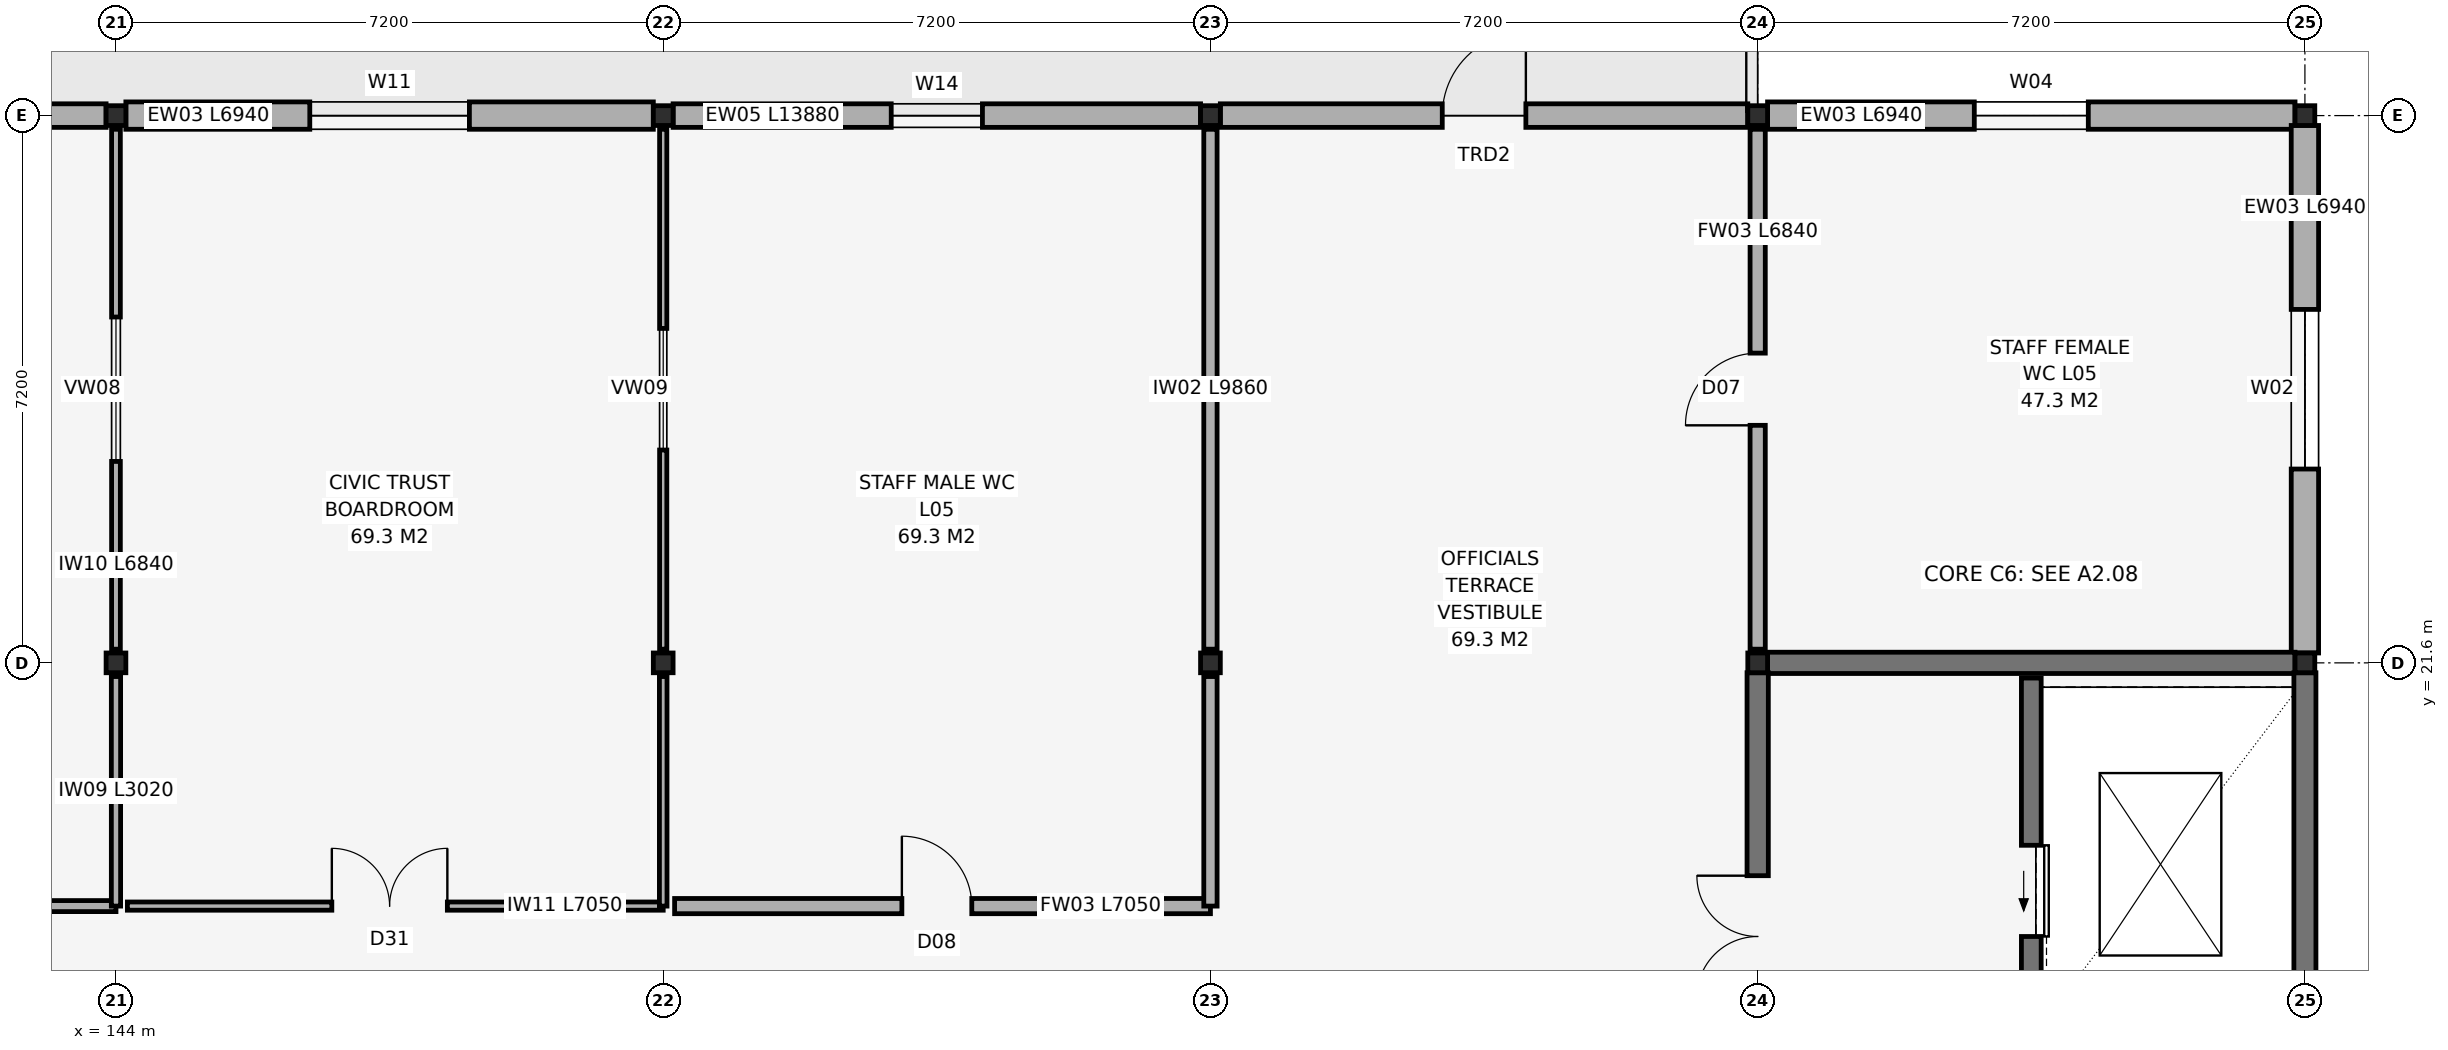
"""IFC4 building model, lengths in metres.
Left out: names, types, materials, properties, quantities, classifications, styles, units other than length and angle.
Written with IfcOpenShell. Run it as: python <this file> out.ifc"""

import sys

from ifc_helpers import new_model, si_unit, direction, frame, frame_2d, origin, origin_2d, place, context, subcontext, project, spatial, rectangle, hollow_rectangle, extrude, element, fill, save


model = new_model("IFC4")
c1 = context("Model", 3, precision=1e-05, world=origin(), true_north=direction((0.0, 1.0)))
c2 = subcontext(c1, "Body", "Model", "MODEL_VIEW")
j1 = project(units=[si_unit("LENGTHUNIT", "METRE"), si_unit("PLANEANGLEUNIT", "RADIAN")], contexts=[c1])
p1 = place(None, origin())
s1 = spatial("IfcSite", under=j1, at=p1, CompositionType="ELEMENT")
p2 = place(p1, origin())
s2 = spatial("IfcBuilding", under=s1, at=p2, CompositionType="ELEMENT")
p3 = place(p2, frame((0.0, 0.0, 23.4)))
s3 = spatial("IfcBuildingStorey", under=s2, at=p3, CompositionType="ELEMENT", Elevation=23.4)
for number, where, z_axis, x_axis in (
    (1, (144.0, 21.6, 0.0), (0.0, 0.0, 1.0), (1.0, 0.0, 0.0)),
    (2, (144.0, 28.8, 0.0), (0.0, 0.0, 1.0), (1.0, 0.0, 0.0)),
    (3, (151.2, 21.6, 0.0), (0.0, 0.0, 1.0), (1.0, 0.0, 0.0)),
    (4, (151.2, 28.8, 0.0), (0.0, 0.0, 1.0), (1.0, 0.0, 0.0)),
    (5, (158.4, 21.6, 0.0), (0.0, 0.0, 1.0), (1.0, 0.0, 0.0)),
    (6, (158.4, 28.8, 0.0), (0.0, 0.0, 1.0), (1.0, 0.0, 0.0)),
    (7, (165.6, 21.6, 0.0), (0.0, 0.0, 1.0), (1.0, 0.0, 0.0)),
    (8, (165.6, 28.8, 0.0), (0.0, 0.0, 1.0), (1.0, 0.0, 0.0)),
    (9, (172.8, 21.6, 0.0), (0.0, 0.0, 1.0), (1.0, 0.0, 0.0)),
    (10, (172.8, 28.8, 0.0), (0.0, 0.0, 1.0), (1.0, 0.0, 0.0)),
):
    element("IfcColumn", number, at=place(p3, frame(where, z_axis=z_axis, x_axis=x_axis)), inside=s3, PredefinedType="COLUMN", context=c2, shape_type="SweptSolid", body=[
        extrude(hollow_rectangle(XDim=0.26, YDim=0.26, WallThickness=0.012, at=origin_2d()), origin(), (0.0, 0.0, 1.0), 4.2),
    ])
p4 = place(p3, frame((136.93, 28.8, 0.0), z_axis=(0.0, 0.0, 1.0), x_axis=(1.0, 0.0, 0.0)))
e11 = element("IfcWall", 11, at=p4, inside=s3, PredefinedType="SOLIDWALL", context=c2, shape_type="SweptSolid", body=[
    extrude(rectangle(XDim=6.94, YDim=0.31, at=frame_2d((3.47, 0.0))), origin(), (0.0, 0.0, 1.0), 3.98),
])
p5 = place(p4, frame((2.92, 0.0, 0.0)))
e12 = element("IfcOpeningElement", 12, at=p5, cuts=e11, PredefinedType="OPENING", context=c2, shape_type="SweptSolid", body=[
    extrude(rectangle(XDim=1.1, YDim=2.2, at=frame_2d((0.55, 1.1))), frame((0.0, 0.17, 0.0), z_axis=(0.0, -1.0, 0.0), x_axis=(1.0, 0.0, 0.0)), (0.0, 0.0, 1.0), 0.34),
])
p6 = place(p3, frame((144.13, 28.8, 0.0), z_axis=(0.0, 0.0, 1.0), x_axis=(1.0, 0.0, 0.0)))
e13 = element("IfcWall", 13, at=p6, inside=s3, PredefinedType="SOLIDWALL", context=c2, shape_type="SweptSolid", body=[
    extrude(rectangle(XDim=6.94, YDim=0.36, at=frame_2d((3.47, 0.0))), origin(), (0.0, 0.0, 1.0), 3.98),
])
p7 = place(p6, frame((2.42, 0.0, 0.95)))
e14 = element("IfcOpeningElement", 14, at=p7, cuts=e13, PredefinedType="OPENING", context=c2, shape_type="SweptSolid", body=[
    extrude(rectangle(XDim=2.1, YDim=1.75, at=frame_2d((1.05, 0.875))), frame((0.0, 0.195, 0.0), z_axis=(0.0, -1.0, 0.0), x_axis=(1.0, 0.0, 0.0)), (0.0, 0.0, 1.0), 0.39),
])
p8 = place(p3, frame((151.33, 28.8, 0.0), z_axis=(0.0, 0.0, 1.0), x_axis=(1.0, 0.0, 0.0)))
e15 = element("IfcWall", 15, at=p8, inside=s3, PredefinedType="SOLIDWALL", context=c2, shape_type="SweptSolid", body=[
    extrude(rectangle(XDim=6.94, YDim=0.31, at=frame_2d((3.47, 0.0))), origin(), (0.0, 0.0, 1.0), 3.98),
])
p9 = place(p8, frame((2.87, 0.0, 0.95)))
e16 = element("IfcOpeningElement", 16, at=p9, cuts=e15, PredefinedType="OPENING", context=c2, shape_type="SweptSolid", body=[
    extrude(rectangle(XDim=1.2, YDim=1.75, at=frame_2d((0.6, 0.875))), frame((0.0, 0.17, 0.0), z_axis=(0.0, -1.0, 0.0), x_axis=(1.0, 0.0, 0.0)), (0.0, 0.0, 1.0), 0.34),
])
p10 = place(p3, frame((158.53, 28.8, 0.0), z_axis=(0.0, 0.0, 1.0), x_axis=(1.0, 0.0, 0.0)))
e17 = element("IfcWall", 17, at=p10, inside=s3, PredefinedType="SOLIDWALL", context=c2, shape_type="SweptSolid", body=[
    extrude(rectangle(XDim=6.94, YDim=0.31, at=frame_2d((3.47, 0.0))), origin(), (0.0, 0.0, 1.0), 3.98),
])
p11 = place(p10, frame((2.92, 0.0, 0.0)))
e18 = element("IfcOpeningElement", 18, at=p11, cuts=e17, PredefinedType="OPENING", context=c2, shape_type="SweptSolid", body=[
    extrude(rectangle(XDim=1.1, YDim=2.2, at=frame_2d((0.55, 1.1))), frame((0.0, 0.17, 0.0), z_axis=(0.0, -1.0, 0.0), x_axis=(1.0, 0.0, 0.0)), (0.0, 0.0, 1.0), 0.34),
])
p12 = place(p3, frame((165.73, 28.8, 0.0), z_axis=(0.0, 0.0, 1.0), x_axis=(1.0, 0.0, 0.0)))
e19 = element("IfcWall", 19, at=p12, inside=s3, PredefinedType="SOLIDWALL", context=c2, shape_type="SweptSolid", body=[
    extrude(rectangle(XDim=6.94, YDim=0.36, at=frame_2d((3.47, 0.0))), origin(), (0.0, 0.0, 1.0), 3.98),
])
p13 = place(p12, frame((2.72, 0.0, 0.95)))
e20 = element("IfcOpeningElement", 20, at=p13, cuts=e19, PredefinedType="OPENING", context=c2, shape_type="SweptSolid", body=[
    extrude(rectangle(XDim=1.5, YDim=2.2, at=frame_2d((0.75, 1.1))), frame((0.0, 0.195, 0.0), z_axis=(0.0, -1.0, 0.0), x_axis=(1.0, 0.0, 0.0)), (0.0, 0.0, 1.0), 0.39),
])
p14 = place(p3, frame((172.8, 21.73, 0.0), z_axis=(0.0, 0.0, 1.0), x_axis=(0.0, 1.0, 0.0)))
e21 = element("IfcWall", 21, at=p14, inside=s3, PredefinedType="SOLIDWALL", context=c2, shape_type="SweptSolid", body=[
    extrude(rectangle(XDim=6.94, YDim=0.36, at=frame_2d((3.47, 0.0))), origin(), (0.0, 0.0, 1.0), 3.98),
])
p15 = place(p14, frame((2.42, 0.0, 0.95)))
e22 = element("IfcOpeningElement", 22, at=p15, cuts=e21, PredefinedType="OPENING", context=c2, shape_type="SweptSolid", body=[
    extrude(rectangle(XDim=2.1, YDim=2.65, at=frame_2d((1.05, 1.325))), frame((0.0, 0.195, 0.0), z_axis=(0.0, -1.0, 0.0), x_axis=(1.0, 0.0, 0.0)), (0.0, 0.0, 1.0), 0.39),
])
p16 = place(p3, frame((165.73, 21.6, 0.0), z_axis=(0.0, 0.0, 1.0), x_axis=(1.0, 0.0, 0.0)))
e23 = element("IfcWall", 23, at=p16, inside=s3, PredefinedType="SHEAR", context=c2, shape_type="SweptSolid", body=[
    extrude(rectangle(XDim=6.94, YDim=0.28, at=frame_2d((3.47, 0.0))), origin(), (0.0, 0.0, 1.0), 4.0),
])
p17 = place(p3, frame((165.6, 14.53, 0.0), z_axis=(0.0, 0.0, 1.0), x_axis=(0.0, 1.0, 0.0)))
e24 = element("IfcWall", 24, at=p17, inside=s3, PredefinedType="SHEAR", context=c2, shape_type="SweptSolid", body=[
    extrude(rectangle(XDim=6.94, YDim=0.28, at=frame_2d((3.47, 0.0))), origin(), (0.0, 0.0, 1.0), 4.0),
])
p18 = place(p17, frame((2.67, 0.0, 0.0)))
e25 = element("IfcOpeningElement", 25, at=p18, cuts=e24, PredefinedType="OPENING", context=c2, shape_type="SweptSolid", body=[
    extrude(rectangle(XDim=1.6, YDim=2.2, at=frame_2d((0.8, 1.1))), frame((0.0, 0.155, 0.0), z_axis=(0.0, -1.0, 0.0), x_axis=(1.0, 0.0, 0.0)), (0.0, 0.0, 1.0), 0.31),
])
p19 = place(p3, frame((172.8, 14.53, 0.0), z_axis=(0.0, 0.0, 1.0), x_axis=(0.0, 1.0, 0.0)))
e26 = element("IfcWall", 26, at=p19, inside=s3, PredefinedType="SHEAR", context=c2, shape_type="SweptSolid", body=[
    extrude(rectangle(XDim=6.94, YDim=0.29, at=frame_2d((3.47, 0.0))), origin(), (0.0, 0.0, 1.0), 4.0),
])
p20 = place(p3, frame((169.2, 7.4, 0.0), z_axis=(0.0, 0.0, 1.0), x_axis=(0.0, 1.0, 0.0)))
e27 = element("IfcWall", 27, at=p20, inside=s3, PredefinedType="SHEAR", context=c2, shape_type="SweptSolid", body=[
    extrude(rectangle(XDim=14.0, YDim=0.26, at=frame_2d((7.0, 0.0))), origin(), (0.0, 0.0, 1.0), 4.0),
])
p21 = place(p20, frame((1.65, 0.0, 0.0)))
e28 = element("IfcOpeningElement", 28, at=p21, cuts=e27, PredefinedType="OPENING", context=c2, shape_type="SweptSolid", body=[
    extrude(rectangle(XDim=1.1, YDim=2.15, at=frame_2d((0.55, 1.075))), frame((0.0, 0.145, 0.0), z_axis=(0.0, -1.0, 0.0), x_axis=(1.0, 0.0, 0.0)), (0.0, 0.0, 1.0), 0.29),
])
p22 = place(p20, frame((10.6, 0.0, 0.0)))
e29 = element("IfcOpeningElement", 29, at=p22, cuts=e27, PredefinedType="OPENING", context=c2, shape_type="SweptSolid", body=[
    extrude(rectangle(XDim=1.2, YDim=2.25, at=frame_2d((0.6, 1.125))), frame((0.0, 0.145, 0.0), z_axis=(0.0, -1.0, 0.0), x_axis=(1.0, 0.0, 0.0)), (0.0, 0.0, 1.0), 0.29),
])
p23 = place(p3, frame((129.6, 18.4, 0.0), z_axis=(0.0, 0.0, 1.0), x_axis=(1.0, 0.0, 0.0)))
e30 = element("IfcWall", 30, at=p23, inside=s3, PredefinedType="PARTITIONING", context=c2, shape_type="SweptSolid", body=[
    extrude(rectangle(XDim=14.4, YDim=0.145, at=frame_2d((7.2, 0.0))), origin(), (0.0, 0.0, 1.0), 3.98),
])
p24 = place(p23, frame((3.13, 0.0, 0.0)))
e31 = element("IfcOpeningElement", 31, at=p24, cuts=e30, PredefinedType="OPENING", context=c2, shape_type="SweptSolid", body=[
    extrude(rectangle(XDim=0.94, YDim=2.15, at=frame_2d((0.47, 1.075))), frame((0.0, 0.087, 0.0), z_axis=(0.0, -1.0, 0.0), x_axis=(1.0, 0.0, 0.0)), (0.0, 0.0, 1.0), 0.175),
])
p25 = place(p3, frame((144.0, 18.4, 0.0), z_axis=(0.0, 0.0, 1.0), x_axis=(0.0, 1.0, 0.0)))
e32 = element("IfcWall", 32, at=p25, inside=s3, PredefinedType="PARTITIONING", context=c2, shape_type="SweptSolid", body=[
    extrude(rectangle(XDim=3.02, YDim=0.122, at=frame_2d((1.51, 0.0))), origin(), (0.0, 0.0, 1.0), 3.98),
])
p26 = place(p3, frame((144.0, 21.78, 0.0), z_axis=(0.0, 0.0, 1.0), x_axis=(0.0, 1.0, 0.0)))
e33 = element("IfcWall", 33, at=p26, inside=s3, PredefinedType="PARTITIONING", context=c2, shape_type="SweptSolid", body=[
    extrude(rectangle(XDim=6.84, YDim=0.115, at=frame_2d((3.42, 0.0))), origin(), (0.0, 0.0, 1.0), 3.98),
])
p27 = place(p26, frame((2.47, 0.0, 0.95)))
e34 = element("IfcOpeningElement", 34, at=p27, cuts=e33, PredefinedType="OPENING", context=c2, shape_type="SweptSolid", body=[
    extrude(rectangle(XDim=1.9, YDim=1.35, at=frame_2d((0.95, 0.675))), frame((0.0, 0.072, 0.0), z_axis=(0.0, -1.0, 0.0), x_axis=(1.0, 0.0, 0.0)), (0.0, 0.0, 1.0), 0.145),
])
p28 = place(p3, frame((144.15, 18.4, 0.0), z_axis=(0.0, 0.0, 1.0), x_axis=(1.0, 0.0, 0.0)))
e35 = element("IfcWall", 35, at=p28, inside=s3, PredefinedType="PARTITIONING", context=c2, shape_type="SweptSolid", body=[
    extrude(rectangle(XDim=7.05, YDim=0.108, at=frame_2d((3.525, 0.0))), origin(), (0.0, 0.0, 1.0), 3.98),
])
p29 = place(p28, frame((2.69, 0.0, 0.0)))
e36 = element("IfcOpeningElement", 36, at=p29, cuts=e35, PredefinedType="OPENING", context=c2, shape_type="SweptSolid", body=[
    extrude(rectangle(XDim=1.52, YDim=2.2, at=frame_2d((0.76, 1.1))), frame((0.0, 0.069, 0.0), z_axis=(0.0, -1.0, 0.0), x_axis=(1.0, 0.0, 0.0)), (0.0, 0.0, 1.0), 0.138),
])
p30 = place(p3, frame((151.2, 18.4, 0.0), z_axis=(0.0, 0.0, 1.0), x_axis=(0.0, 1.0, 0.0)))
e37 = element("IfcWall", 37, at=p30, inside=s3, PredefinedType="PARTITIONING", context=c2, shape_type="SweptSolid", body=[
    extrude(rectangle(XDim=3.02, YDim=0.1, at=frame_2d((1.51, 0.0))), origin(), (0.0, 0.0, 1.0), 3.98),
])
p31 = place(p3, frame((151.2, 21.78, 0.0), z_axis=(0.0, 0.0, 1.0), x_axis=(0.0, 1.0, 0.0)))
e38 = element("IfcWall", 38, at=p31, inside=s3, PredefinedType="PARTITIONING", context=c2, shape_type="SweptSolid", body=[
    extrude(rectangle(XDim=6.84, YDim=0.095, at=frame_2d((3.42, 0.0))), origin(), (0.0, 0.0, 1.0), 3.98),
])
p32 = place(p31, frame((2.62, 0.0, 0.95)))
e39 = element("IfcOpeningElement", 39, at=p32, cuts=e38, PredefinedType="OPENING", context=c2, shape_type="SweptSolid", body=[
    extrude(rectangle(XDim=1.6, YDim=1.35, at=frame_2d((0.8, 0.675))), frame((0.0, 0.062, 0.0), z_axis=(0.0, -1.0, 0.0), x_axis=(1.0, 0.0, 0.0)), (0.0, 0.0, 1.0), 0.125),
])
p33 = place(p3, frame((151.35, 18.4, 0.0), z_axis=(0.0, 0.0, 1.0), x_axis=(1.0, 0.0, 0.0)))
e40 = element("IfcWall", 40, at=p33, inside=s3, PredefinedType="SOLIDWALL", context=c2, shape_type="SweptSolid", body=[
    extrude(rectangle(XDim=7.05, YDim=0.2, at=frame_2d((3.525, 0.0))), origin(), (0.0, 0.0, 1.0), 3.98),
])
p34 = place(p33, frame((2.99, 0.0, 0.0)))
e41 = element("IfcOpeningElement", 41, at=p34, cuts=e40, PredefinedType="OPENING", context=c2, shape_type="SweptSolid", body=[
    extrude(rectangle(XDim=0.92, YDim=2.1, at=frame_2d((0.46, 1.05))), frame((0.0, 0.115, 0.0), z_axis=(0.0, -1.0, 0.0), x_axis=(1.0, 0.0, 0.0)), (0.0, 0.0, 1.0), 0.23),
])
p35 = place(p3, frame((158.4, 18.4, 0.0), z_axis=(0.0, 0.0, 1.0), x_axis=(0.0, 1.0, 0.0)))
e42 = element("IfcWall", 42, at=p35, inside=s3, PredefinedType="PARTITIONING", context=c2, shape_type="SweptSolid", body=[
    extrude(rectangle(XDim=3.02, YDim=0.175, at=frame_2d((1.51, 0.0))), origin(), (0.0, 0.0, 1.0), 3.98),
])
p36 = place(p3, frame((158.4, 21.78, 0.0), z_axis=(0.0, 0.0, 1.0), x_axis=(0.0, 1.0, 0.0)))
e43 = element("IfcWall", 43, at=p36, inside=s3, PredefinedType="PARTITIONING", context=c2, shape_type="SweptSolid", body=[
    extrude(rectangle(XDim=6.84, YDim=0.175, at=frame_2d((3.42, 0.0))), origin(), (0.0, 0.0, 1.0), 3.98),
])
p37 = place(p3, frame((165.6, 21.78, 0.0), z_axis=(0.0, 0.0, 1.0), x_axis=(0.0, 1.0, 0.0)))
e44 = element("IfcWall", 44, at=p37, inside=s3, PredefinedType="SOLIDWALL", context=c2, shape_type="SweptSolid", body=[
    extrude(rectangle(XDim=6.84, YDim=0.2, at=frame_2d((3.42, 0.0))), origin(), (0.0, 0.0, 1.0), 3.98),
])
p38 = place(p37, frame((2.945, 0.0, 0.0)))
e45 = element("IfcOpeningElement", 45, at=p38, cuts=e44, PredefinedType="OPENING", context=c2, shape_type="SweptSolid", body=[
    extrude(rectangle(XDim=0.95, YDim=2.1, at=frame_2d((0.475, 1.05))), frame((0.0, 0.115, 0.0), z_axis=(0.0, -1.0, 0.0), x_axis=(1.0, 0.0, 0.0)), (0.0, 0.0, 1.0), 0.23),
])
p39 = place(p7, origin())
e46 = element("IfcWindow", 46, at=p39, inside=s3, PartitioningType="SINGLE_PANEL", PredefinedType="WINDOW", context=c2, shape_type="SweptSolid", body=[
    extrude(rectangle(XDim=2.1, YDim=1.75, at=frame_2d((1.05, 0.875))), frame((0.0, 0.03, 0.0), z_axis=(0.0, -1.0, 0.0), x_axis=(1.0, 0.0, 0.0)), (0.0, 0.0, 1.0), 0.06),
])
fill(e14, e46)
p40 = place(p9, origin())
e47 = element("IfcWindow", 47, at=p40, inside=s3, PartitioningType="SINGLE_PANEL", PredefinedType="WINDOW", context=c2, shape_type="SweptSolid", body=[
    extrude(rectangle(XDim=1.2, YDim=1.75, at=frame_2d((0.6, 0.875))), frame((0.0, 0.03, 0.0), z_axis=(0.0, -1.0, 0.0), x_axis=(1.0, 0.0, 0.0)), (0.0, 0.0, 1.0), 0.06),
])
fill(e16, e47)
p41 = place(p11, origin())
e48 = element("IfcDoor", 48, at=p41, inside=s3, OperationType="SINGLE_SWING_RIGHT", PredefinedType="DOOR", context=c2, shape_type="SweptSolid", body=[
    extrude(rectangle(XDim=1.1, YDim=2.2, at=frame_2d((0.55, 1.1))), frame((0.0, 0.025, 0.0), z_axis=(0.0, -1.0, 0.0), x_axis=(1.0, 0.0, 0.0)), (0.0, 0.0, 1.0), 0.05),
])
fill(e18, e48)
p42 = place(p13, origin())
e49 = element("IfcWindow", 49, at=p42, inside=s3, PartitioningType="SINGLE_PANEL", PredefinedType="WINDOW", context=c2, shape_type="SweptSolid", body=[
    extrude(rectangle(XDim=1.5, YDim=2.2, at=frame_2d((0.75, 1.1))), frame((0.0, 0.03, 0.0), z_axis=(0.0, -1.0, 0.0), x_axis=(1.0, 0.0, 0.0)), (0.0, 0.0, 1.0), 0.06),
])
fill(e20, e49)
p43 = place(p15, origin())
e50 = element("IfcWindow", 50, at=p43, inside=s3, PartitioningType="SINGLE_PANEL", PredefinedType="WINDOW", context=c2, shape_type="SweptSolid", body=[
    extrude(rectangle(XDim=2.1, YDim=2.65, at=frame_2d((1.05, 1.325))), frame((0.0, 0.03, 0.0), z_axis=(0.0, -1.0, 0.0), x_axis=(1.0, 0.0, 0.0)), (0.0, 0.0, 1.0), 0.06),
])
fill(e22, e50)
p44 = place(p22, origin())
e51 = element("IfcDoor", 51, at=p44, inside=s3, OperationType="SLIDING_TO_LEFT", PredefinedType="DOOR", context=c2, shape_type="SweptSolid", body=[
    extrude(rectangle(XDim=1.2, YDim=2.25, at=frame_2d((0.6, 1.125))), frame((0.0, 0.025, 0.0), z_axis=(0.0, -1.0, 0.0), x_axis=(1.0, 0.0, 0.0)), (0.0, 0.0, 1.0), 0.05),
])
fill(e29, e51)
p45 = place(p18, origin())
e52 = element("IfcDoor", 52, at=p45, inside=s3, OperationType="DOUBLE_SWING_LEFT", PredefinedType="DOOR", context=c2, shape_type="SweptSolid", body=[
    extrude(rectangle(XDim=1.6, YDim=2.2, at=frame_2d((0.8, 1.1))), frame((0.0, 0.025, 0.0), z_axis=(0.0, -1.0, 0.0), x_axis=(1.0, 0.0, 0.0)), (0.0, 0.0, 1.0), 0.05),
])
fill(e25, e52)
p46 = place(p27, origin())
e53 = element("IfcWindow", 53, at=p46, inside=s3, PartitioningType="SINGLE_PANEL", PredefinedType="WINDOW", context=c2, shape_type="SweptSolid", body=[
    extrude(rectangle(XDim=1.9, YDim=1.35, at=frame_2d((0.95, 0.675))), frame((0.0, 0.03, 0.0), z_axis=(0.0, -1.0, 0.0), x_axis=(1.0, 0.0, 0.0)), (0.0, 0.0, 1.0), 0.06),
])
fill(e34, e53)
p47 = place(p29, origin())
e54 = element("IfcDoor", 54, at=p47, inside=s3, OperationType="DOUBLE_SWING_LEFT", PredefinedType="DOOR", context=c2, shape_type="SweptSolid", body=[
    extrude(rectangle(XDim=1.52, YDim=2.2, at=frame_2d((0.76, 1.1))), frame((0.0, 0.025, 0.0), z_axis=(0.0, -1.0, 0.0), x_axis=(1.0, 0.0, 0.0)), (0.0, 0.0, 1.0), 0.05),
])
fill(e36, e54)
p48 = place(p32, origin())
e55 = element("IfcWindow", 55, at=p48, inside=s3, PartitioningType="SINGLE_PANEL", PredefinedType="WINDOW", context=c2, shape_type="SweptSolid", body=[
    extrude(rectangle(XDim=1.6, YDim=1.35, at=frame_2d((0.8, 0.675))), frame((0.0, 0.03, 0.0), z_axis=(0.0, -1.0, 0.0), x_axis=(1.0, 0.0, 0.0)), (0.0, 0.0, 1.0), 0.06),
])
fill(e39, e55)
p49 = place(p34, origin())
e56 = element("IfcDoor", 56, at=p49, inside=s3, OperationType="SINGLE_SWING_LEFT", PredefinedType="DOOR", context=c2, shape_type="SweptSolid", body=[
    extrude(rectangle(XDim=0.92, YDim=2.1, at=frame_2d((0.46, 1.05))), frame((0.0, 0.025, 0.0), z_axis=(0.0, -1.0, 0.0), x_axis=(1.0, 0.0, 0.0)), (0.0, 0.0, 1.0), 0.05),
])
fill(e41, e56)
p50 = place(p38, frame((0.95, 0.0, 0.0), z_axis=(0.0, 0.0, 1.0), x_axis=(-1.0, 0.0, 0.0)))
e57 = element("IfcDoor", 57, at=p50, inside=s3, OperationType="SINGLE_SWING_RIGHT", PredefinedType="DOOR", context=c2, shape_type="SweptSolid", body=[
    extrude(rectangle(XDim=0.95, YDim=2.1, at=frame_2d((0.475, 1.05))), frame((0.0, 0.025, 0.0), z_axis=(0.0, -1.0, 0.0), x_axis=(1.0, 0.0, 0.0)), (0.0, 0.0, 1.0), 0.05),
])
fill(e45, e57)
save(model, sys.argv[1])
